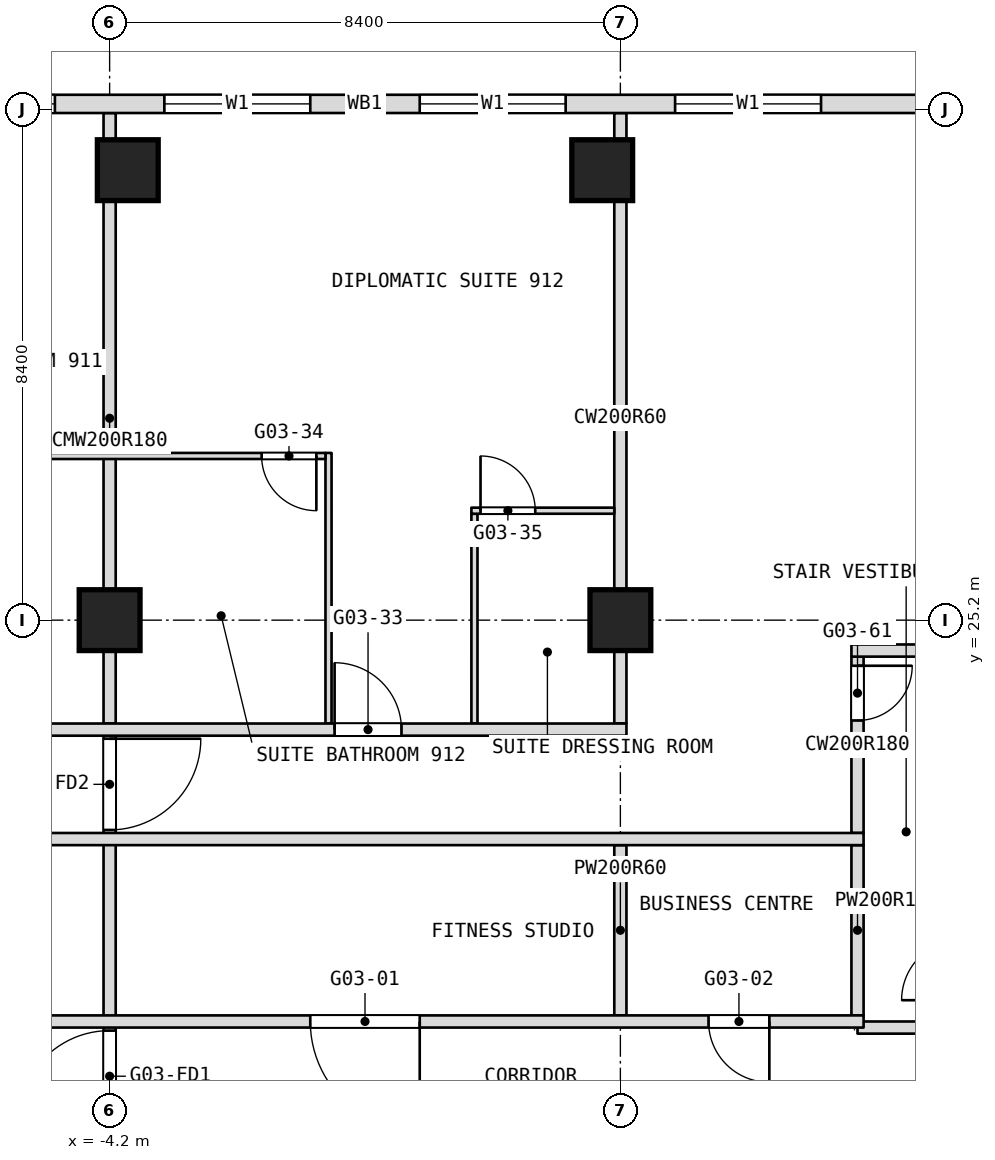
"""IFC4 building model, lengths in metres.
Left out: names, types, materials, properties, quantities, classifications, styles, units other than length and angle.
Written with IfcOpenShell. Run it as: python <this file> out.ifc"""

import sys

from ifc_helpers import new_model, si_unit, direction, frame, frame_2d, origin, origin_2d, place, context, subcontext, project, spatial, rectangle, extrude, element, fill, save


model = new_model("IFC4")
c1 = context("Model", 3, precision=1e-05, world=origin(), true_north=direction((0.0, 1.0)))
c2 = subcontext(c1, "Body", "Model", "MODEL_VIEW")
j1 = project(units=[si_unit("LENGTHUNIT", "METRE"), si_unit("PLANEANGLEUNIT", "RADIAN")], contexts=[c1])
p1 = place(None, origin())
s1 = spatial("IfcSite", under=j1, at=p1, CompositionType="ELEMENT")
p2 = place(p1, origin())
s2 = spatial("IfcBuilding", under=s1, at=p2, CompositionType="ELEMENT")
p3 = place(p2, frame((0.0, 0.0, 47.3)))
s3 = spatial("IfcBuildingStorey", under=s2, at=p3, CompositionType="ELEMENT", Elevation=47.3)
for number, where, z_axis, x_axis in (
    (1, (-4.2, 25.2, 0.0), (0.0, 0.0, 1.0), (1.0, 0.0, 0.0)),
    (2, (4.2, 25.2, 0.0), (0.0, 0.0, 1.0), (1.0, 0.0, 0.0)),
    (3, (-3.901, 32.6, 0.0), (0.0, 0.0, 1.0), (1.0, 0.0, 0.0)),
    (4, (3.901, 32.6, 0.0), (0.0, 0.0, 1.0), (1.0, 0.0, 0.0)),
):
    element("IfcColumn", number, at=place(p3, frame(where, z_axis=z_axis, x_axis=x_axis)), inside=s3, PredefinedType="COLUMN", context=c2, shape_type="SweptSolid", body=[
        extrude(rectangle(XDim=1.0, YDim=1.0, at=origin_2d()), origin(), (0.0, 0.0, 1.0), 3.6),
    ])
p4 = place(p3, frame((8.1, 18.7, 0.0), z_axis=(0.0, 0.0, 1.0), x_axis=(0.0, 1.0, 0.0)))
e5 = element("IfcWall", 5, at=p4, inside=s3, PredefinedType="PARTITIONING", context=c2, shape_type="SweptSolid", body=[
    extrude(rectangle(XDim=2.8, YDim=0.2, at=frame_2d((1.4, 0.0))), origin(), (0.0, 0.0, 1.0), 3.34),
])
p5 = place(p3, frame((8.1, 21.7, 0.0), z_axis=(0.0, 0.0, 1.0), x_axis=(0.0, 1.0, 0.0)))
e6 = element("IfcWall", 6, at=p5, inside=s3, PredefinedType="PARTITIONING", context=c2, shape_type="SweptSolid", body=[
    extrude(rectangle(XDim=2.9, YDim=0.2, at=frame_2d((1.45, 0.0))), origin(), (0.0, 0.0, 1.0), 3.34),
])
p6 = place(p5, frame((1.85, 0.0, 0.0)))
e7 = element("IfcOpeningElement", 7, at=p6, cuts=e6, PredefinedType="OPENING", context=c2, shape_type="SweptSolid", body=[
    extrude(rectangle(XDim=0.9, YDim=2.1, at=frame_2d((0.45, 1.05))), frame((0.0, 0.1, 0.0), z_axis=(0.0, -1.0, 0.0), x_axis=(1.0, 0.0, 0.0)), (0.0, 0.0, 1.0), 0.2),
])
p7 = place(p3, frame((4.2, 18.7, 0.0), z_axis=(0.0, 0.0, 1.0), x_axis=(0.0, 1.0, 0.0)))
e8 = element("IfcWall", 8, at=p7, inside=s3, PredefinedType="PARTITIONING", context=c2, shape_type="SweptSolid", body=[
    extrude(rectangle(XDim=2.8, YDim=0.2, at=frame_2d((1.4, 0.0))), origin(), (0.0, 0.0, 1.0), 3.34),
])
p8 = place(p3, frame((4.2, 23.5, 0.0), z_axis=(0.0, 0.0, 1.0), x_axis=(0.0, 1.0, 0.0)))
e9 = element("IfcWall", 9, at=p8, inside=s3, PredefinedType="PARTITIONING", context=c2, shape_type="SweptSolid", body=[
    extrude(rectangle(XDim=10.04, YDim=0.2, at=frame_2d((5.02, 0.0))), origin(), (0.0, 0.0, 1.0), 3.34),
])
p9 = place(p3, frame((1.8, 23.5, 0.0), z_axis=(0.0, 0.0, 1.0), x_axis=(0.0, 1.0, 0.0)))
e10 = element("IfcWall", 10, at=p9, inside=s3, PredefinedType="PARTITIONING", context=c2, shape_type="SweptSolid", body=[
    extrude(rectangle(XDim=3.45, YDim=0.1, at=frame_2d((1.725, 0.0))), origin(), (0.0, 0.0, 1.0), 3.34),
])
p10 = place(p3, frame((-0.6, 23.5, 0.0), z_axis=(0.0, 0.0, 1.0), x_axis=(0.0, 1.0, 0.0)))
e11 = element("IfcWall", 11, at=p10, inside=s3, PredefinedType="PARTITIONING", context=c2, shape_type="SweptSolid", body=[
    extrude(rectangle(XDim=4.45, YDim=0.1, at=frame_2d((2.225, 0.0))), origin(), (0.0, 0.0, 1.0), 3.34),
])
p11 = place(p3, frame((-4.2, 16.8, 0.0), z_axis=(0.0, 0.0, 1.0), x_axis=(0.0, 1.0, 0.0)))
e12 = element("IfcWall", 12, at=p11, inside=s3, PredefinedType="PARTITIONING", context=c2, shape_type="SweptSolid", body=[
    extrude(rectangle(XDim=6.7, YDim=0.2, at=frame_2d((3.35, 0.0))), origin(), (0.0, 0.0, 1.0), 3.34),
])
p12 = place(p11, frame((0.15, 0.0, 0.0)))
e13 = element("IfcOpeningElement", 13, at=p12, cuts=e12, PredefinedType="OPENING", context=c2, shape_type="SweptSolid", body=[
    extrude(rectangle(XDim=1.5, YDim=2.1, at=frame_2d((0.75, 1.05))), frame((0.0, 0.1, 0.0), z_axis=(0.0, -1.0, 0.0), x_axis=(1.0, 0.0, 0.0)), (0.0, 0.0, 1.0), 0.2),
])
p13 = place(p11, frame((4.95, 0.0, 0.0)))
e14 = element("IfcOpeningElement", 14, at=p13, cuts=e12, PredefinedType="OPENING", context=c2, shape_type="SweptSolid", body=[
    extrude(rectangle(XDim=1.5, YDim=2.1, at=frame_2d((0.75, 1.05))), frame((0.0, 0.1, 0.0), z_axis=(0.0, -1.0, 0.0), x_axis=(1.0, 0.0, 0.0)), (0.0, 0.0, 1.0), 0.2),
])
p14 = place(p3, frame((-4.2, 23.5, 0.0), z_axis=(0.0, 0.0, 1.0), x_axis=(0.0, 1.0, 0.0)))
e15 = element("IfcWall", 15, at=p14, inside=s3, PredefinedType="PARTITIONING", context=c2, shape_type="SweptSolid", body=[
    extrude(rectangle(XDim=10.04, YDim=0.2, at=frame_2d((5.02, 0.0))), origin(), (0.0, 0.0, 1.0), 3.34),
])
p15 = place(p3, frame((8.1, 18.5, 0.0), z_axis=(0.0, 0.0, 1.0), x_axis=(1.0, 0.0, 0.0)))
e16 = element("IfcWall", 16, at=p15, inside=s3, PredefinedType="PARTITIONING", context=c2, shape_type="SweptSolid", body=[
    extrude(rectangle(XDim=1.6, YDim=0.2, at=frame_2d((0.8, 0.0))), origin(), (0.0, 0.0, 1.0), 3.34),
])
p16 = place(p3, frame((-16.9, 18.6, 0.0), z_axis=(0.0, 0.0, 1.0), x_axis=(1.0, 0.0, 0.0)))
e17 = element("IfcWall", 17, at=p16, inside=s3, PredefinedType="PARTITIONING", context=c2, shape_type="SweptSolid", body=[
    extrude(rectangle(XDim=25.1, YDim=0.2, at=frame_2d((12.55, 0.0))), origin(), (0.0, 0.0, 1.0), 3.34),
])
p17 = place(p16, frame((16.0, 0.0, 0.0)))
e18 = element("IfcOpeningElement", 18, at=p17, cuts=e17, PredefinedType="OPENING", context=c2, shape_type="SweptSolid", body=[
    extrude(rectangle(XDim=1.8, YDim=2.1, at=frame_2d((0.9, 1.05))), frame((0.0, 0.1, 0.0), z_axis=(0.0, -1.0, 0.0), x_axis=(1.0, 0.0, 0.0)), (0.0, 0.0, 1.0), 0.2),
])
p18 = place(p16, frame((22.55, 0.0, 0.0)))
e19 = element("IfcOpeningElement", 19, at=p18, cuts=e17, PredefinedType="OPENING", context=c2, shape_type="SweptSolid", body=[
    extrude(rectangle(XDim=1.0, YDim=2.1, at=frame_2d((0.5, 1.05))), frame((0.0, 0.1, 0.0), z_axis=(0.0, -1.0, 0.0), x_axis=(1.0, 0.0, 0.0)), (0.0, 0.0, 1.0), 0.2),
])
p19 = place(p16, frame((5.9, 0.0, 0.0)))
e20 = element("IfcOpeningElement", 20, at=p19, cuts=e17, PredefinedType="OPENING", context=c2, shape_type="SweptSolid", body=[
    extrude(rectangle(XDim=1.0, YDim=2.1, at=frame_2d((0.5, 1.05))), frame((0.0, 0.1, 0.0), z_axis=(0.0, -1.0, 0.0), x_axis=(1.0, 0.0, 0.0)), (0.0, 0.0, 1.0), 0.2),
])
p20 = place(p16, frame((10.1, 0.0, 0.0)))
e21 = element("IfcOpeningElement", 21, at=p20, cuts=e17, PredefinedType="OPENING", context=c2, shape_type="SweptSolid", body=[
    extrude(rectangle(XDim=1.0, YDim=2.1, at=frame_2d((0.5, 1.05))), frame((0.0, 0.1, 0.0), z_axis=(0.0, -1.0, 0.0), x_axis=(1.0, 0.0, 0.0)), (0.0, 0.0, 1.0), 0.2),
])
p21 = place(p16, frame((1.7, 0.0, 0.0)))
e22 = element("IfcOpeningElement", 22, at=p21, cuts=e17, PredefinedType="OPENING", context=c2, shape_type="SweptSolid", body=[
    extrude(rectangle(XDim=1.0, YDim=2.1, at=frame_2d((0.5, 1.05))), frame((0.0, 0.1, 0.0), z_axis=(0.0, -1.0, 0.0), x_axis=(1.0, 0.0, 0.0)), (0.0, 0.0, 1.0), 0.2),
])
p22 = place(p3, frame((-16.7, 21.6, 0.0), z_axis=(0.0, 0.0, 1.0), x_axis=(1.0, 0.0, 0.0)))
e23 = element("IfcWall", 23, at=p22, inside=s3, PredefinedType="PARTITIONING", context=c2, shape_type="SweptSolid", body=[
    extrude(rectangle(XDim=24.9, YDim=0.2, at=frame_2d((12.45, 0.0))), origin(), (0.0, 0.0, 1.0), 3.34),
])
p23 = place(p22, frame((1.6, 0.0, 0.0)))
e24 = element("IfcOpeningElement", 24, at=p23, cuts=e23, PredefinedType="OPENING", context=c2, shape_type="SweptSolid", body=[
    extrude(rectangle(XDim=1.0, YDim=2.1, at=frame_2d((0.5, 1.05))), frame((0.0, 0.1, 0.0), z_axis=(0.0, -1.0, 0.0), x_axis=(1.0, 0.0, 0.0)), (0.0, 0.0, 1.0), 0.2),
])
p24 = place(p3, frame((-16.7, 23.4, 0.0), z_axis=(0.0, 0.0, 1.0), x_axis=(1.0, 0.0, 0.0)))
e25 = element("IfcWall", 25, at=p24, inside=s3, PredefinedType="PARTITIONING", context=c2, shape_type="SweptSolid", body=[
    extrude(rectangle(XDim=21.0, YDim=0.2, at=frame_2d((10.5, 0.0))), origin(), (0.0, 0.0, 1.0), 3.34),
])
p25 = place(p24, frame((2.4, 0.0, 0.0)))
e26 = element("IfcOpeningElement", 26, at=p25, cuts=e25, PredefinedType="OPENING", context=c2, shape_type="SweptSolid", body=[
    extrude(rectangle(XDim=0.9, YDim=2.1, at=frame_2d((0.45, 1.05))), frame((0.0, 0.1, 0.0), z_axis=(0.0, -1.0, 0.0), x_axis=(1.0, 0.0, 0.0)), (0.0, 0.0, 1.0), 0.2),
])
p26 = place(p24, frame((7.7, 0.0, 0.0)))
e27 = element("IfcOpeningElement", 27, at=p26, cuts=e25, PredefinedType="OPENING", context=c2, shape_type="SweptSolid", body=[
    extrude(rectangle(XDim=1.1, YDim=2.1, at=frame_2d((0.55, 1.05))), frame((0.0, 0.1, 0.0), z_axis=(0.0, -1.0, 0.0), x_axis=(1.0, 0.0, 0.0)), (0.0, 0.0, 1.0), 0.2),
])
p27 = place(p24, frame((16.2, 0.0, 0.0)))
e28 = element("IfcOpeningElement", 28, at=p27, cuts=e25, PredefinedType="OPENING", context=c2, shape_type="SweptSolid", body=[
    extrude(rectangle(XDim=1.1, YDim=2.1, at=frame_2d((0.55, 1.05))), frame((0.0, 0.1, 0.0), z_axis=(0.0, -1.0, 0.0), x_axis=(1.0, 0.0, 0.0)), (0.0, 0.0, 1.0), 0.2),
])
p28 = place(p3, frame((8.0, 24.7, 0.0), z_axis=(0.0, 0.0, 1.0), x_axis=(1.0, 0.0, 0.0)))
e29 = element("IfcWall", 29, at=p28, inside=s3, PredefinedType="PARTITIONING", context=c2, shape_type="SweptSolid", body=[
    extrude(rectangle(XDim=1.7, YDim=0.2, at=frame_2d((0.85, 0.0))), origin(), (0.0, 0.0, 1.0), 3.34),
])
p29 = place(p3, frame((1.75, 27.0, 0.0), z_axis=(0.0, 0.0, 1.0), x_axis=(1.0, 0.0, 0.0)))
e30 = element("IfcWall", 30, at=p29, inside=s3, PredefinedType="PARTITIONING", context=c2, shape_type="SweptSolid", body=[
    extrude(rectangle(XDim=2.35, YDim=0.1, at=frame_2d((1.175, 0.0))), origin(), (0.0, 0.0, 1.0), 3.34),
])
p30 = place(p29, frame((0.15, 0.0, 0.0)))
e31 = element("IfcOpeningElement", 31, at=p30, cuts=e30, PredefinedType="OPENING", context=c2, shape_type="SweptSolid", body=[
    extrude(rectangle(XDim=0.9, YDim=2.1, at=frame_2d((0.45, 1.05))), frame((0.0, 0.05, 0.0), z_axis=(0.0, -1.0, 0.0), x_axis=(1.0, 0.0, 0.0)), (0.0, 0.0, 1.0), 0.1),
])
p31 = place(p3, frame((-7.85, 27.9, 0.0), z_axis=(0.0, 0.0, 1.0), x_axis=(1.0, 0.0, 0.0)))
e32 = element("IfcWall", 32, at=p31, inside=s3, PredefinedType="PARTITIONING", context=c2, shape_type="SweptSolid", body=[
    extrude(rectangle(XDim=7.2, YDim=0.1, at=frame_2d((3.6, 0.0))), origin(), (0.0, 0.0, 1.0), 3.34),
])
p32 = place(p31, frame((0.15, 0.0, 0.0)))
e33 = element("IfcOpeningElement", 33, at=p32, cuts=e32, PredefinedType="OPENING", context=c2, shape_type="SweptSolid", body=[
    extrude(rectangle(XDim=0.9, YDim=2.1, at=frame_2d((0.45, 1.05))), frame((0.0, 0.05, 0.0), z_axis=(0.0, -1.0, 0.0), x_axis=(1.0, 0.0, 0.0)), (0.0, 0.0, 1.0), 0.1),
])
p33 = place(p31, frame((6.15, 0.0, 0.0)))
e34 = element("IfcOpeningElement", 34, at=p33, cuts=e32, PredefinedType="OPENING", context=c2, shape_type="SweptSolid", body=[
    extrude(rectangle(XDim=0.9, YDim=2.1, at=frame_2d((0.45, 1.05))), frame((0.0, 0.05, 0.0), z_axis=(0.0, -1.0, 0.0), x_axis=(1.0, 0.0, 0.0)), (0.0, 0.0, 1.0), 0.1),
])
p34 = place(p3, frame((23.406, 33.69, 0.0), z_axis=(0.0, 0.0, 1.0), x_axis=(-1.0, 0.0, 0.0)))
e35 = element("IfcWall", 35, at=p34, inside=s3, PredefinedType="NOTDEFINED", context=c2, shape_type="SweptSolid", body=[
    extrude(rectangle(XDim=46.812, YDim=0.3, at=frame_2d((23.406, 0.0))), origin(), (0.0, 0.0, 1.0), 3.6),
])
p35 = place(p34, frame((2.186, 0.0, 0.9)))
e36 = element("IfcOpeningElement", 36, at=p35, cuts=e35, PredefinedType="OPENING", context=c2, shape_type="SweptSolid", body=[
    extrude(rectangle(XDim=2.4, YDim=2.1, at=frame_2d((1.2, 1.05))), frame((0.0, 0.15, 0.0), z_axis=(0.0, -1.0, 0.0), x_axis=(1.0, 0.0, 0.0)), (0.0, 0.0, 1.0), 0.3),
])
p36 = place(p34, frame((7.506, 0.0, 0.9)))
e37 = element("IfcOpeningElement", 37, at=p36, cuts=e35, PredefinedType="OPENING", context=c2, shape_type="SweptSolid", body=[
    extrude(rectangle(XDim=2.4, YDim=2.1, at=frame_2d((1.2, 1.05))), frame((0.0, 0.15, 0.0), z_axis=(0.0, -1.0, 0.0), x_axis=(1.0, 0.0, 0.0)), (0.0, 0.0, 1.0), 0.3),
])
p37 = place(p34, frame((11.706, 0.0, 0.9)))
e38 = element("IfcOpeningElement", 38, at=p37, cuts=e35, PredefinedType="OPENING", context=c2, shape_type="SweptSolid", body=[
    extrude(rectangle(XDim=2.4, YDim=2.1, at=frame_2d((1.2, 1.05))), frame((0.0, 0.15, 0.0), z_axis=(0.0, -1.0, 0.0), x_axis=(1.0, 0.0, 0.0)), (0.0, 0.0, 1.0), 0.3),
])
p38 = place(p34, frame((15.906, 0.0, 0.9)))
e39 = element("IfcOpeningElement", 39, at=p38, cuts=e35, PredefinedType="OPENING", context=c2, shape_type="SweptSolid", body=[
    extrude(rectangle(XDim=2.4, YDim=2.1, at=frame_2d((1.2, 1.05))), frame((0.0, 0.15, 0.0), z_axis=(0.0, -1.0, 0.0), x_axis=(1.0, 0.0, 0.0)), (0.0, 0.0, 1.0), 0.3),
])
p39 = place(p34, frame((20.106, 0.0, 0.9)))
e40 = element("IfcOpeningElement", 40, at=p39, cuts=e35, PredefinedType="OPENING", context=c2, shape_type="SweptSolid", body=[
    extrude(rectangle(XDim=2.4, YDim=2.1, at=frame_2d((1.2, 1.05))), frame((0.0, 0.15, 0.0), z_axis=(0.0, -1.0, 0.0), x_axis=(1.0, 0.0, 0.0)), (0.0, 0.0, 1.0), 0.3),
])
p40 = place(p34, frame((24.306, 0.0, 0.9)))
e41 = element("IfcOpeningElement", 41, at=p40, cuts=e35, PredefinedType="OPENING", context=c2, shape_type="SweptSolid", body=[
    extrude(rectangle(XDim=2.4, YDim=2.1, at=frame_2d((1.2, 1.05))), frame((0.0, 0.15, 0.0), z_axis=(0.0, -1.0, 0.0), x_axis=(1.0, 0.0, 0.0)), (0.0, 0.0, 1.0), 0.3),
])
p41 = place(p34, frame((28.506, 0.0, 0.9)))
e42 = element("IfcOpeningElement", 42, at=p41, cuts=e35, PredefinedType="OPENING", context=c2, shape_type="SweptSolid", body=[
    extrude(rectangle(XDim=2.4, YDim=2.1, at=frame_2d((1.2, 1.05))), frame((0.0, 0.15, 0.0), z_axis=(0.0, -1.0, 0.0), x_axis=(1.0, 0.0, 0.0)), (0.0, 0.0, 1.0), 0.3),
])
p42 = place(p34, frame((32.706, 0.0, 0.9)))
e43 = element("IfcOpeningElement", 43, at=p42, cuts=e35, PredefinedType="OPENING", context=c2, shape_type="SweptSolid", body=[
    extrude(rectangle(XDim=2.4, YDim=2.1, at=frame_2d((1.2, 1.05))), frame((0.0, 0.15, 0.0), z_axis=(0.0, -1.0, 0.0), x_axis=(1.0, 0.0, 0.0)), (0.0, 0.0, 1.0), 0.3),
])
p43 = place(p34, frame((36.906, 0.0, 0.9)))
e44 = element("IfcOpeningElement", 44, at=p43, cuts=e35, PredefinedType="OPENING", context=c2, shape_type="SweptSolid", body=[
    extrude(rectangle(XDim=2.4, YDim=2.1, at=frame_2d((1.2, 1.05))), frame((0.0, 0.15, 0.0), z_axis=(0.0, -1.0, 0.0), x_axis=(1.0, 0.0, 0.0)), (0.0, 0.0, 1.0), 0.3),
])
p44 = place(p34, frame((42.226, 0.0, 0.9)))
e45 = element("IfcOpeningElement", 45, at=p44, cuts=e35, PredefinedType="OPENING", context=c2, shape_type="SweptSolid", body=[
    extrude(rectangle(XDim=2.4, YDim=2.1, at=frame_2d((1.2, 1.05))), frame((0.0, 0.15, 0.0), z_axis=(0.0, -1.0, 0.0), x_axis=(1.0, 0.0, 0.0)), (0.0, 0.0, 1.0), 0.3),
])
p45 = place(p6, origin())
e46 = element("IfcDoor", 46, at=p45, inside=s3, OperationType="SINGLE_SWING_LEFT", PredefinedType="DOOR", context=c2, shape_type="SweptSolid", body=[
    extrude(rectangle(XDim=0.9, YDim=2.1, at=frame_2d((0.45, 1.05))), frame((0.0, 0.025, 0.0), z_axis=(0.0, -1.0, 0.0), x_axis=(1.0, 0.0, 0.0)), (0.0, 0.0, 1.0), 0.05),
])
fill(e7, e46)
p46 = place(p17, origin())
e47 = element("IfcDoor", 47, at=p46, inside=s3, OperationType="DOUBLE_DOOR_SINGLE_SWING", PredefinedType="DOOR", context=c2, shape_type="SweptSolid", body=[
    extrude(rectangle(XDim=1.8, YDim=2.1, at=frame_2d((0.9, 1.05))), frame((0.0, 0.025, 0.0), z_axis=(0.0, -1.0, 0.0), x_axis=(1.0, 0.0, 0.0)), (0.0, 0.0, 1.0), 0.05),
])
fill(e18, e47)
p47 = place(p18, origin())
e48 = element("IfcDoor", 48, at=p47, inside=s3, OperationType="SINGLE_SWING_RIGHT", PredefinedType="DOOR", context=c2, shape_type="SweptSolid", body=[
    extrude(rectangle(XDim=1.0, YDim=2.1, at=frame_2d((0.5, 1.05))), frame((0.0, 0.025, 0.0), z_axis=(0.0, -1.0, 0.0), x_axis=(1.0, 0.0, 0.0)), (0.0, 0.0, 1.0), 0.05),
])
fill(e19, e48)
p48 = place(p27, origin())
e49 = element("IfcDoor", 49, at=p48, inside=s3, OperationType="SINGLE_SWING_LEFT", PredefinedType="DOOR", context=c2, shape_type="SweptSolid", body=[
    extrude(rectangle(XDim=1.1, YDim=2.1, at=frame_2d((0.55, 1.05))), frame((0.0, 0.025, 0.0), z_axis=(0.0, -1.0, 0.0), x_axis=(1.0, 0.0, 0.0)), (0.0, 0.0, 1.0), 0.05),
])
fill(e28, e49)
p49 = place(p30, origin())
e50 = element("IfcDoor", 50, at=p49, inside=s3, OperationType="SINGLE_SWING_RIGHT", PredefinedType="DOOR", context=c2, shape_type="SweptSolid", body=[
    extrude(rectangle(XDim=0.9, YDim=2.1, at=frame_2d((0.45, 1.05))), frame((0.0, 0.025, 0.0), z_axis=(0.0, -1.0, 0.0), x_axis=(1.0, 0.0, 0.0)), (0.0, 0.0, 1.0), 0.05),
])
fill(e31, e50)
p50 = place(p33, origin())
e51 = element("IfcDoor", 51, at=p50, inside=s3, OperationType="SINGLE_SWING_LEFT", PredefinedType="DOOR", context=c2, shape_type="SweptSolid", body=[
    extrude(rectangle(XDim=0.9, YDim=2.1, at=frame_2d((0.45, 1.05))), frame((0.0, 0.025, 0.0), z_axis=(0.0, -1.0, 0.0), x_axis=(1.0, 0.0, 0.0)), (0.0, 0.0, 1.0), 0.05),
])
fill(e34, e51)
p51 = place(p38, origin())
e52 = element("IfcWindow", 52, at=p51, inside=s3, PartitioningType="SINGLE_PANEL", PredefinedType="WINDOW", context=c2, shape_type="SweptSolid", body=[
    extrude(rectangle(XDim=2.4, YDim=2.1, at=frame_2d((1.2, 1.05))), frame((0.0, 0.03, 0.0), z_axis=(0.0, -1.0, 0.0), x_axis=(1.0, 0.0, 0.0)), (0.0, 0.0, 1.0), 0.06),
])
fill(e39, e52)
p52 = place(p39, origin())
e53 = element("IfcWindow", 53, at=p52, inside=s3, PartitioningType="SINGLE_PANEL", PredefinedType="WINDOW", context=c2, shape_type="SweptSolid", body=[
    extrude(rectangle(XDim=2.4, YDim=2.1, at=frame_2d((1.2, 1.05))), frame((0.0, 0.03, 0.0), z_axis=(0.0, -1.0, 0.0), x_axis=(1.0, 0.0, 0.0)), (0.0, 0.0, 1.0), 0.06),
])
fill(e40, e53)
p53 = place(p40, origin())
e54 = element("IfcWindow", 54, at=p53, inside=s3, PartitioningType="SINGLE_PANEL", PredefinedType="WINDOW", context=c2, shape_type="SweptSolid", body=[
    extrude(rectangle(XDim=2.4, YDim=2.1, at=frame_2d((1.2, 1.05))), frame((0.0, 0.03, 0.0), z_axis=(0.0, -1.0, 0.0), x_axis=(1.0, 0.0, 0.0)), (0.0, 0.0, 1.0), 0.06),
])
fill(e41, e54)
p54 = place(p41, origin())
e55 = element("IfcWindow", 55, at=p54, inside=s3, PartitioningType="SINGLE_PANEL", PredefinedType="WINDOW", context=c2, shape_type="SweptSolid", body=[
    extrude(rectangle(XDim=2.4, YDim=2.1, at=frame_2d((1.2, 1.05))), frame((0.0, 0.03, 0.0), z_axis=(0.0, -1.0, 0.0), x_axis=(1.0, 0.0, 0.0)), (0.0, 0.0, 1.0), 0.06),
])
fill(e42, e55)
p55 = place(p12, origin())
e56 = element("IfcDoor", 56, at=p55, inside=s3, OperationType="DOUBLE_DOOR_DOUBLE_SWING", PredefinedType="DOOR", context=c2, shape_type="SweptSolid", body=[
    extrude(rectangle(XDim=1.5, YDim=2.1, at=frame_2d((0.75, 1.05))), frame((0.0, 0.025, 0.0), z_axis=(0.0, -1.0, 0.0), x_axis=(1.0, 0.0, 0.0)), (0.0, 0.0, 1.0), 0.05),
])
fill(e13, e56)
p56 = place(p13, origin())
e57 = element("IfcDoor", 57, at=p56, inside=s3, OperationType="DOUBLE_DOOR_DOUBLE_SWING", PredefinedType="DOOR", context=c2, shape_type="SweptSolid", body=[
    extrude(rectangle(XDim=1.5, YDim=2.1, at=frame_2d((0.75, 1.05))), frame((0.0, 0.025, 0.0), z_axis=(0.0, -1.0, 0.0), x_axis=(1.0, 0.0, 0.0)), (0.0, 0.0, 1.0), 0.05),
])
fill(e14, e57)
save(model, sys.argv[1])
